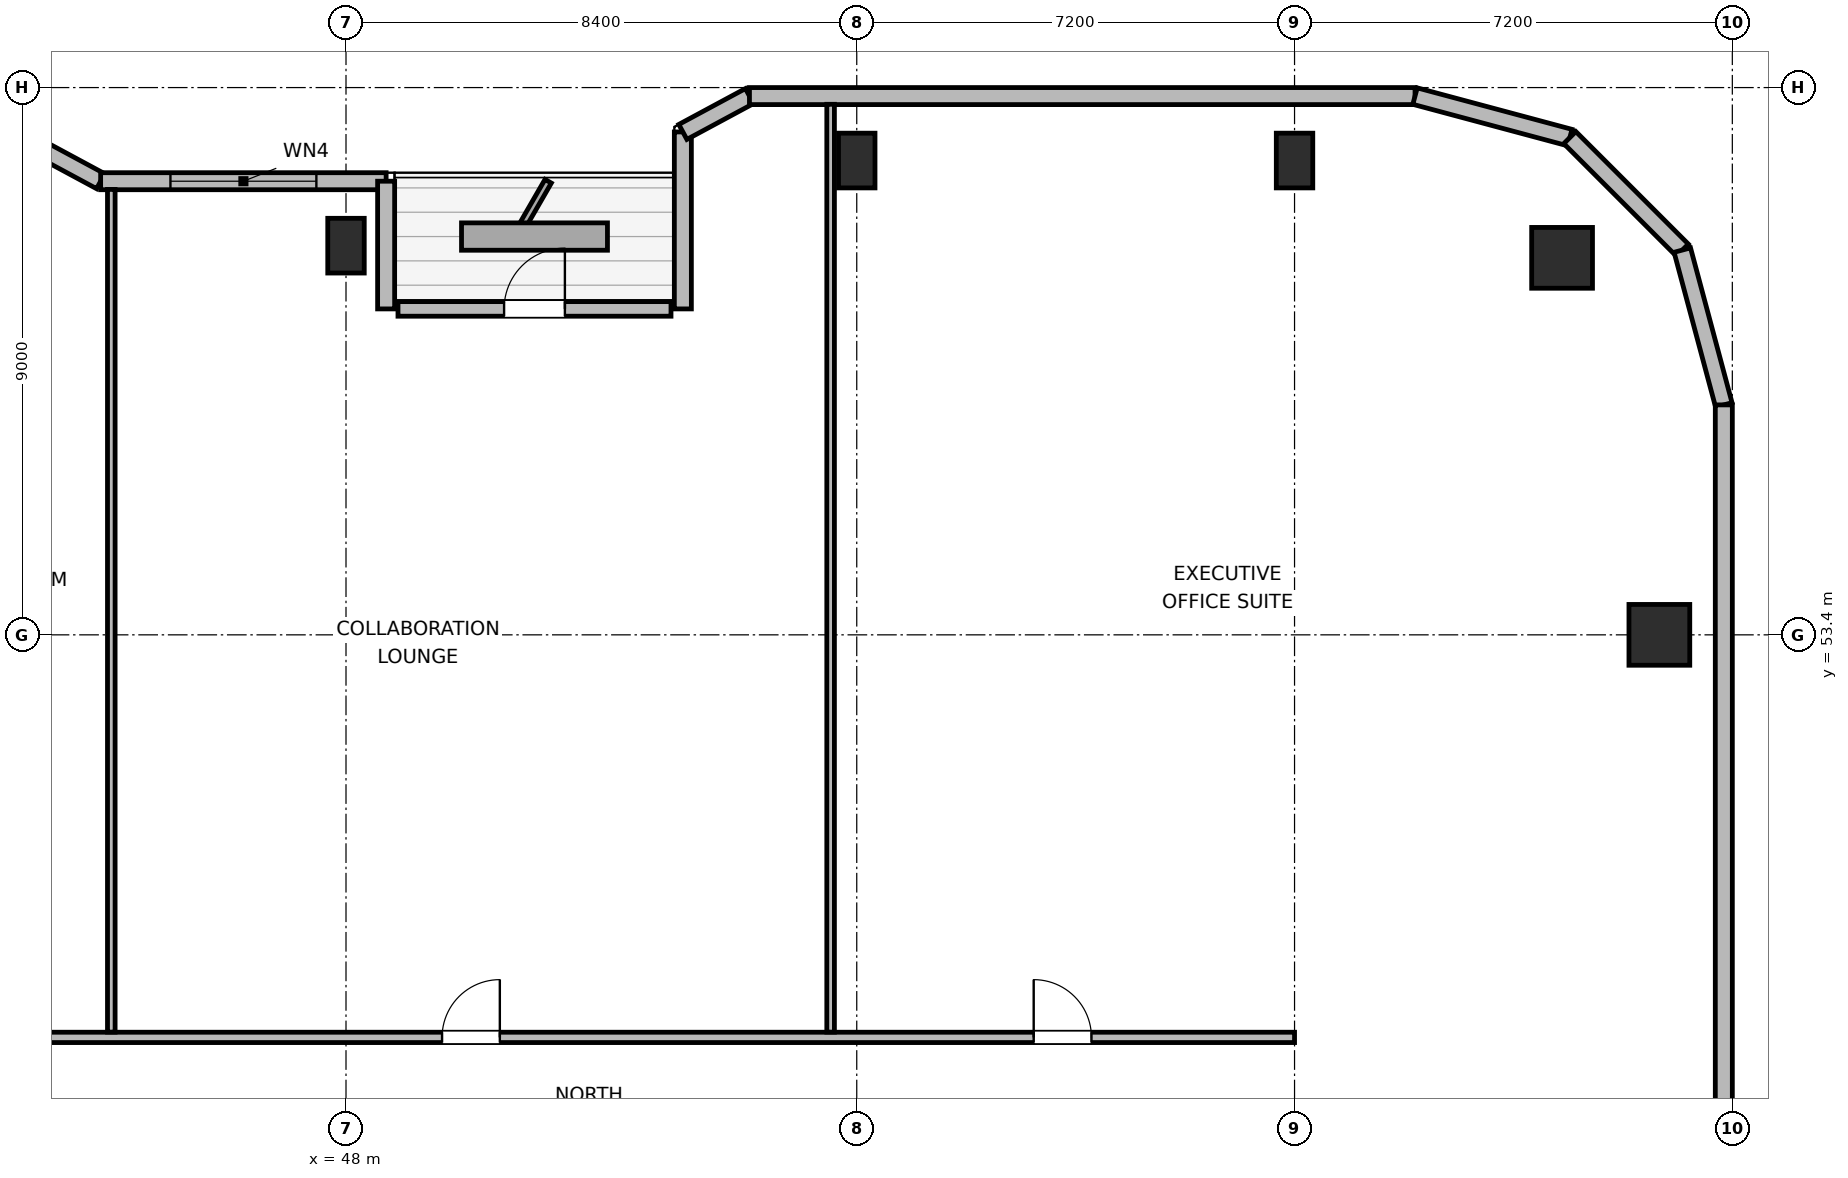
"""IFC4 building model, lengths in metres.
Left out: names, types, materials, properties, quantities, classifications, styles, units other than length and angle.
Written with IfcOpenShell. Run it as: python <this file> out.ifc"""

import sys

from ifc_helpers import new_model, si_unit, direction, frame, frame_2d, origin, origin_2d, place, context, subcontext, project, spatial, rectangle, circle, extrude, element, fill, save


model = new_model("IFC4")
c1 = context("Model", 3, precision=1e-05, world=origin(), true_north=direction((0.0, 1.0)))
c2 = subcontext(c1, "Body", "Model", "MODEL_VIEW")
j1 = project(units=[si_unit("LENGTHUNIT", "METRE"), si_unit("PLANEANGLEUNIT", "RADIAN")], contexts=[c1])
p1 = place(None, origin())
s1 = spatial("IfcSite", under=j1, at=p1, CompositionType="ELEMENT")
p2 = place(p1, origin())
s2 = spatial("IfcBuilding", under=s1, at=p2, CompositionType="ELEMENT")
p3 = place(p2, frame((0.0, 0.0, 247.2)))
s3 = spatial("IfcBuildingStorey", under=s2, at=p3, CompositionType="ELEMENT", Elevation=247.2)
p4 = place(p3, frame((68.0, 59.6, 0.0), z_axis=(0.0, 0.0, 1.0), x_axis=(1.0, 0.0, 0.0)))
e1 = element("IfcColumn", 1, at=p4, inside=s3, PredefinedType="COLUMN", context=c2, shape_type="SweptSolid", body=[
    extrude(circle(Radius=0.5, at=origin_2d()), origin(), (0.0, 0.0, 1.0), 3.9),
])
for number, where, z_axis, x_axis in (
    (2, (48.0, 59.8, 0.0), (0.0, 0.0, 1.0), (1.0, 0.0, 0.0)),
    (3, (56.4, 61.2, 0.0), (0.0, 0.0, 1.0), (1.0, 0.0, 0.0)),
    (4, (63.6, 61.2, 0.0), (0.0, 0.0, 1.0), (1.0, 0.0, 0.0)),
):
    element("IfcColumn", number, at=place(p3, frame(where, z_axis=z_axis, x_axis=x_axis)), inside=s3, PredefinedType="COLUMN", context=c2, shape_type="SweptSolid", body=[
        extrude(rectangle(XDim=0.6, YDim=0.9, at=origin_2d()), origin(), (0.0, 0.0, 1.0), 3.9),
    ])
p5 = place(p3, frame((69.6, 53.4, 0.0), z_axis=(0.0, 0.0, 1.0), x_axis=(1.0, 0.0, 0.0)))
e5 = element("IfcColumn", 5, at=p5, inside=s3, PredefinedType="COLUMN", context=c2, shape_type="SweptSolid", body=[
    extrude(rectangle(XDim=1.0, YDim=1.0, at=origin_2d()), origin(), (0.0, 0.0, 1.0), 3.9),
])
p6 = place(p3, frame((41.365, 62.26, 0.0), z_axis=(0.0, 0.0, 1.0), x_axis=(0.880473754814, -0.474094892488, 0.0)))
e6 = element("IfcWall", 6, at=p6, inside=s3, PredefinedType="SOLIDWALL", context=c2, shape_type="SweptSolid", body=[
    extrude(rectangle(XDim=2.953, YDim=0.28, at=frame_2d((1.477, 0.0))), origin(), (0.0, 0.0, 1.0), 2.265),
])
p7 = place(p3, frame((43.965, 60.86, 0.0), z_axis=(0.0, 0.0, 1.0), x_axis=(1.0, 0.0, 0.0)))
e7 = element("IfcWall", 7, at=p7, inside=s3, PredefinedType="SOLIDWALL", context=c2, shape_type="SweptSolid", body=[
    extrude(rectangle(XDim=4.695, YDim=0.28, at=frame_2d((2.348, 0.0))), origin(), (0.0, 0.0, 1.0), 2.265),
])
p8 = place(p7, frame((1.148, 0.0, 0.85)))
e8 = element("IfcOpeningElement", 8, at=p8, cuts=e7, PredefinedType="OPENING", context=c2, shape_type="SweptSolid", body=[
    extrude(rectangle(XDim=2.4, YDim=1.15, at=frame_2d((1.2, 0.575))), frame((0.0, 0.15, 0.0), z_axis=(0.0, -1.0, 0.0), x_axis=(1.0, 0.0, 0.0)), (0.0, 0.0, 1.0), 0.3),
])
p9 = place(p3, frame((48.66, 60.86, 0.0), z_axis=(0.0, 0.0, 1.0), x_axis=(0.0, -1.0, 0.0)))
e9 = element("IfcWall", 9, at=p9, inside=s3, PredefinedType="SOLIDWALL", context=c2, shape_type="SweptSolid", body=[
    extrude(rectangle(XDim=2.1, YDim=0.28, at=frame_2d((1.05, 0.0))), origin(), (0.0, 0.0, 1.0), 2.265),
])
p10 = place(p3, frame((48.855, 58.76, 0.0), z_axis=(0.0, 0.0, 1.0), x_axis=(1.0, 0.0, 0.0)))
e10 = element("IfcWall", 10, at=p10, inside=s3, PredefinedType="SOLIDWALL", context=c2, shape_type="SweptSolid", body=[
    extrude(rectangle(XDim=4.49, YDim=0.24, at=frame_2d((2.245, 0.0))), origin(), (0.0, 0.0, 1.0), 3.68),
])
p11 = place(p10, frame((1.745, 0.0, 0.0)))
e11 = element("IfcOpeningElement", 11, at=p11, cuts=e10, PredefinedType="OPENING", context=c2, shape_type="SweptSolid", body=[
    extrude(rectangle(XDim=1.0, YDim=2.02, at=frame_2d((0.5, 1.01))), frame((0.0, 0.13, 0.0), z_axis=(0.0, -1.0, 0.0), x_axis=(1.0, 0.0, 0.0)), (0.0, 0.0, 1.0), 0.26),
])
p12 = place(p3, frame((53.54, 58.76, 0.0), z_axis=(0.0, 0.0, 1.0), x_axis=(0.0, 1.0, 0.0)))
e12 = element("IfcWall", 12, at=p12, inside=s3, PredefinedType="SOLIDWALL", context=c2, shape_type="SweptSolid", body=[
    extrude(rectangle(XDim=2.91, YDim=0.28, at=frame_2d((1.455, 0.0))), origin(), (0.0, 0.0, 1.0), 2.265),
])
p13 = place(p3, frame((53.54, 61.67, 0.0), z_axis=(0.0, 0.0, 1.0), x_axis=(0.880515214249, 0.474017887296, 0.0)))
e13 = element("IfcWall", 13, at=p13, inside=s3, PredefinedType="SOLIDWALL", context=c2, shape_type="SweptSolid", body=[
    extrude(rectangle(XDim=1.244, YDim=0.28, at=frame_2d((0.622, 0.0))), origin(), (0.0, 0.0, 1.0), 3.68),
])
p14 = place(p3, frame((54.635, 62.26, 0.0), z_axis=(0.0, 0.0, 1.0), x_axis=(1.0, 0.0, 0.0)))
e14 = element("IfcWall", 14, at=p14, inside=s3, PredefinedType="SOLIDWALL", context=c2, shape_type="SweptSolid", body=[
    extrude(rectangle(XDim=10.946, YDim=0.28, at=frame_2d((5.473, 0.0))), origin(), (0.0, 0.0, 1.0), 3.68),
])
p15 = place(p3, frame((65.582, 62.26, 0.0), z_axis=(0.0, 0.0, 1.0), x_axis=(0.965883534663, -0.258976828051, 0.0)))
e15 = element("IfcWall", 15, at=p15, inside=s3, PredefinedType="SOLIDWALL", context=c2, shape_type="SweptSolid", body=[
    extrude(rectangle(XDim=2.636, YDim=0.28, at=frame_2d((1.318, 0.0))), origin(), (0.0, 0.0, 1.0), 3.68),
])
p16 = place(p3, frame((68.127, 61.577, 0.0), z_axis=(0.0, 0.0, 1.0), x_axis=(0.707153437963, -0.707060121331, 0.0)))
e16 = element("IfcWall", 16, at=p16, inside=s3, PredefinedType="SOLIDWALL", context=c2, shape_type="SweptSolid", body=[
    extrude(rectangle(XDim=2.616, YDim=0.28, at=frame_2d((1.308, 0.0))), origin(), (0.0, 0.0, 1.0), 3.68),
])
p17 = place(p3, frame((69.978, 59.728, 0.0), z_axis=(0.0, 0.0, 1.0), x_axis=(0.2588904131, -0.965906700466, 0.0)))
e17 = element("IfcWall", 17, at=p17, inside=s3, PredefinedType="SOLIDWALL", context=c2, shape_type="SweptSolid", body=[
    extrude(rectangle(XDim=2.636, YDim=0.28, at=frame_2d((1.318, 0.0))), origin(), (0.0, 0.0, 1.0), 3.68),
])
p18 = place(p3, frame((70.66, 57.182, 0.0), z_axis=(0.0, 0.0, 1.0), x_axis=(0.0, -1.0, 0.0)))
e18 = element("IfcWall", 18, at=p18, inside=s3, PredefinedType="SOLIDWALL", context=c2, shape_type="SweptSolid", body=[
    extrude(rectangle(XDim=14.442, YDim=0.28, at=frame_2d((7.221, 0.0))), origin(), (0.0, 0.0, 1.0), 3.68),
])
p19 = place(p3, frame((30.075, 46.78, 0.0), z_axis=(0.0, 0.0, 1.0), x_axis=(1.0, 0.0, 0.0)))
e19 = element("IfcWall", 19, at=p19, inside=s3, PredefinedType="PARTITIONING", context=c2, shape_type="SweptSolid", body=[
    extrude(rectangle(XDim=33.525, YDim=0.17, at=frame_2d((16.763, 0.0))), origin(), (0.0, 0.0, 1.0), 3.68),
])
p20 = place(p19, frame((4.693, 0.0, 0.0)))
e20 = element("IfcOpeningElement", 20, at=p20, cuts=e19, PredefinedType="OPENING", context=c2, shape_type="SweptSolid", body=[
    extrude(rectangle(XDim=0.95, YDim=2.04, at=frame_2d((0.475, 1.02))), frame((0.0, 0.095, 0.0), z_axis=(0.0, -1.0, 0.0), x_axis=(1.0, 0.0, 0.0)), (0.0, 0.0, 1.0), 0.19),
])
p21 = place(p19, frame((11.725, 0.0, 0.0)))
e21 = element("IfcOpeningElement", 21, at=p21, cuts=e19, PredefinedType="OPENING", context=c2, shape_type="SweptSolid", body=[
    extrude(rectangle(XDim=0.95, YDim=2.04, at=frame_2d((0.475, 1.02))), frame((0.0, 0.095, 0.0), z_axis=(0.0, -1.0, 0.0), x_axis=(1.0, 0.0, 0.0)), (0.0, 0.0, 1.0), 0.19),
])
p22 = place(p19, frame((19.505, 0.0, 0.0)))
e22 = element("IfcOpeningElement", 22, at=p22, cuts=e19, PredefinedType="OPENING", context=c2, shape_type="SweptSolid", body=[
    extrude(rectangle(XDim=0.95, YDim=2.04, at=frame_2d((0.475, 1.02))), frame((0.0, 0.095, 0.0), z_axis=(0.0, -1.0, 0.0), x_axis=(1.0, 0.0, 0.0)), (0.0, 0.0, 1.0), 0.19),
])
p23 = place(p19, frame((29.235, 0.0, 0.0)))
e23 = element("IfcOpeningElement", 23, at=p23, cuts=e19, PredefinedType="OPENING", context=c2, shape_type="SweptSolid", body=[
    extrude(rectangle(XDim=0.95, YDim=2.04, at=frame_2d((0.475, 1.02))), frame((0.0, 0.095, 0.0), z_axis=(0.0, -1.0, 0.0), x_axis=(1.0, 0.0, 0.0)), (0.0, 0.0, 1.0), 0.19),
])
p24 = place(p3, frame((44.14, 46.867, 0.0), z_axis=(0.0, 0.0, 1.0), x_axis=(0.0, 1.0, 0.0)))
e24 = element("IfcWall", 24, at=p24, inside=s3, PredefinedType="PARTITIONING", context=c2, shape_type="SweptSolid", body=[
    extrude(rectangle(XDim=13.858, YDim=0.125, at=frame_2d((6.929, 0.0))), origin(), (0.0, 0.0, 1.0), 3.043),
])
p25 = place(p3, frame((55.97, 46.867, 0.0), z_axis=(0.0, 0.0, 1.0), x_axis=(0.0, 1.0, 0.0)))
e25 = element("IfcWall", 25, at=p25, inside=s3, PredefinedType="PARTITIONING", context=c2, shape_type="SweptSolid", body=[
    extrude(rectangle(XDim=15.258, YDim=0.125, at=frame_2d((7.629, 0.0))), origin(), (0.0, 0.0, 1.0), 3.043),
])
p26 = place(p8, origin())
e26 = element("IfcWindow", 26, at=p26, inside=s3, PartitioningType="SINGLE_PANEL", PredefinedType="WINDOW", context=c2, shape_type="SweptSolid", body=[
    extrude(rectangle(XDim=2.4, YDim=1.15, at=frame_2d((1.2, 0.575))), frame((0.0, 0.03, 0.0), z_axis=(0.0, -1.0, 0.0), x_axis=(1.0, 0.0, 0.0)), (0.0, 0.0, 1.0), 0.06),
])
fill(e8, e26)
p27 = place(p11, origin())
e27 = element("IfcDoor", 27, at=p27, inside=s3, OperationType="SINGLE_SWING_RIGHT", PredefinedType="DOOR", context=c2, shape_type="SweptSolid", body=[
    extrude(rectangle(XDim=1.0, YDim=2.02, at=frame_2d((0.5, 1.01))), frame((0.0, 0.025, 0.0), z_axis=(0.0, -1.0, 0.0), x_axis=(1.0, 0.0, 0.0)), (0.0, 0.0, 1.0), 0.05),
])
fill(e11, e27)
p28 = place(p22, origin())
e28 = element("IfcDoor", 28, at=p28, inside=s3, OperationType="SINGLE_SWING_RIGHT", PredefinedType="DOOR", context=c2, shape_type="SweptSolid", body=[
    extrude(rectangle(XDim=0.95, YDim=2.04, at=frame_2d((0.475, 1.02))), frame((0.0, 0.025, 0.0), z_axis=(0.0, -1.0, 0.0), x_axis=(1.0, 0.0, 0.0)), (0.0, 0.0, 1.0), 0.05),
])
fill(e22, e28)
p29 = place(p23, origin())
e29 = element("IfcDoor", 29, at=p29, inside=s3, OperationType="SINGLE_SWING_LEFT", PredefinedType="DOOR", context=c2, shape_type="SweptSolid", body=[
    extrude(rectangle(XDim=0.95, YDim=2.04, at=frame_2d((0.475, 1.02))), frame((0.0, 0.025, 0.0), z_axis=(0.0, -1.0, 0.0), x_axis=(1.0, 0.0, 0.0)), (0.0, 0.0, 1.0), 0.05),
])
fill(e23, e29)
save(model, sys.argv[1])
